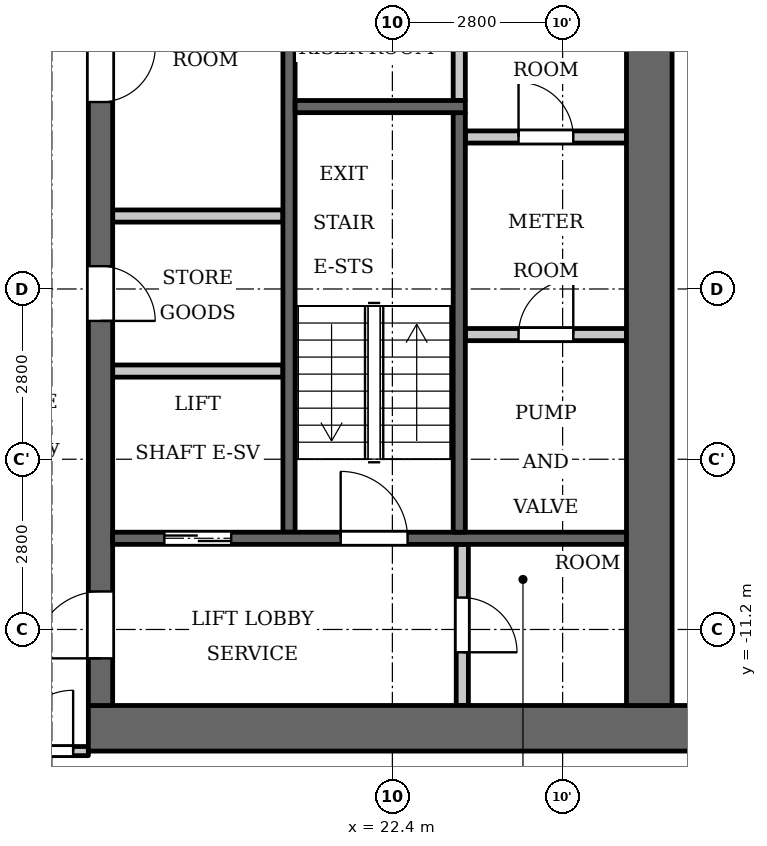
"""IFC4 building model, lengths in metres.
Left out: names, types, materials, properties, quantities, classifications, styles, units other than length and angle.
Written with IfcOpenShell. Run it as: python <this file> out.ifc"""

import sys

from ifc_helpers import new_model, si_unit, direction, frame, frame_2d, origin, place, context, subcontext, project, spatial, rectangle, extrude, element, fill, save


model = new_model("IFC4")
c1 = context("Model", 3, precision=1e-05, world=origin(), true_north=direction((0.0, 1.0)))
c2 = subcontext(c1, "Body", "Model", "MODEL_VIEW")
j1 = project(units=[si_unit("LENGTHUNIT", "METRE"), si_unit("PLANEANGLEUNIT", "RADIAN")], contexts=[c1])
p1 = place(None, origin())
s1 = spatial("IfcSite", under=j1, at=p1, CompositionType="ELEMENT")
p2 = place(p1, origin())
s2 = spatial("IfcBuilding", under=s1, at=p2, CompositionType="ELEMENT")
p3 = place(p2, frame((0.0, 0.0, 150.1)))
s3 = spatial("IfcBuildingStorey", under=s2, at=p3, CompositionType="ELEMENT", Elevation=150.1)
p4 = place(p3, frame((23.5, -2.5, 0.0), z_axis=(0.0, 0.0, 1.0), x_axis=(0.0, 1.0, 0.0)))
e1 = element("IfcWall", 1, at=p4, inside=s3, PredefinedType="PARTITIONING", context=c2, shape_type="SweptSolid", body=[
    extrude(rectangle(XDim=2.65, YDim=0.2, at=frame_2d((1.325, 0.0))), origin(), (0.0, 0.0, 1.0), 3.2),
])
p5 = place(p3, frame((20.7, -9.6, 0.0), z_axis=(0.0, 0.0, 1.0), x_axis=(0.0, 1.0, 0.0)))
e2 = element("IfcWall", 2, at=p5, inside=s3, PredefinedType="SHEAR", context=c2, shape_type="SweptSolid", body=[
    extrude(rectangle(XDim=9.75, YDim=0.2, at=frame_2d((4.875, 0.0))), origin(), (0.0, 0.0, 1.0), 3.2),
])
p6 = place(p3, frame((17.4, -12.825, 0.0), z_axis=(0.0, 0.0, 1.0), x_axis=(1.0, 0.0, 0.0)))
e3 = element("IfcWall", 3, at=p6, inside=s3, PredefinedType="SHEAR", context=c2, shape_type="SweptSolid", body=[
    extrude(rectangle(XDim=10.4, YDim=0.75, at=frame_2d((5.2, 0.0))), origin(), (0.0, 0.0, 1.0), 3.2),
])
p7 = place(p3, frame((17.8, -4.4, 0.0), z_axis=(0.0, 0.0, 1.0), x_axis=(1.0, 0.0, 0.0)))
e4 = element("IfcWall", 4, at=p7, inside=s3, PredefinedType="PARTITIONING", context=c2, shape_type="SweptSolid", body=[
    extrude(rectangle(XDim=2.8, YDim=0.2, at=frame_2d((1.4, 0.0))), origin(), (0.0, 0.0, 1.0), 3.2),
])
p8 = place(p3, frame((17.6, -12.45, 0.0), z_axis=(0.0, 0.0, 1.0), x_axis=(0.0, 1.0, 0.0)))
e5 = element("IfcWall", 5, at=p8, inside=s3, PredefinedType="SHEAR", context=c2, shape_type="SweptSolid", body=[
    extrude(rectangle(XDim=24.9, YDim=0.4, at=frame_2d((12.45, 0.0))), origin(), (0.0, 0.0, 1.0), 3.2),
])
p9 = place(p8, frame((6.325, 0.0, 0.0)))
e6 = element("IfcOpeningElement", 6, at=p9, cuts=e5, PredefinedType="OPENING", context=c2, shape_type="SweptSolid", body=[
    extrude(rectangle(XDim=0.9, YDim=2.1, at=frame_2d((0.45, 1.05))), frame((0.0, 0.21, 0.0), z_axis=(0.0, -1.0, 0.0), x_axis=(1.0, 0.0, 0.0)), (0.0, 0.0, 1.0), 0.42),
])
p10 = place(p8, frame((9.925, 0.0, 0.0)))
e7 = element("IfcOpeningElement", 7, at=p10, cuts=e5, PredefinedType="OPENING", context=c2, shape_type="SweptSolid", body=[
    extrude(rectangle(XDim=0.9, YDim=2.1, at=frame_2d((0.45, 1.05))), frame((0.0, 0.21, 0.0), z_axis=(0.0, -1.0, 0.0), x_axis=(1.0, 0.0, 0.0)), (0.0, 0.0, 1.0), 0.42),
])
p11 = place(p8, frame((15.6, 0.0, 0.0)))
e8 = element("IfcOpeningElement", 8, at=p11, cuts=e5, PredefinedType="OPENING", context=c2, shape_type="SweptSolid", body=[
    extrude(rectangle(XDim=1.1, YDim=2.1, at=frame_2d((0.55, 1.05))), frame((0.0, 0.21, 0.0), z_axis=(0.0, -1.0, 0.0), x_axis=(1.0, 0.0, 0.0)), (0.0, 0.0, 1.0), 0.42),
])
p12 = place(p8, frame((18.0, 0.0, 0.0)))
e9 = element("IfcOpeningElement", 9, at=p12, cuts=e5, PredefinedType="OPENING", context=c2, shape_type="SweptSolid", body=[
    extrude(rectangle(XDim=1.1, YDim=2.1, at=frame_2d((0.55, 1.05))), frame((0.0, 0.21, 0.0), z_axis=(0.0, -1.0, 0.0), x_axis=(1.0, 0.0, 0.0)), (0.0, 0.0, 1.0), 0.42),
])
p13 = place(p8, frame((23.025, 0.0, 0.0)))
e10 = element("IfcOpeningElement", 10, at=p13, cuts=e5, PredefinedType="OPENING", context=c2, shape_type="SweptSolid", body=[
    extrude(rectangle(XDim=1.1, YDim=2.1, at=frame_2d((0.55, 1.05))), frame((0.0, 0.21, 0.0), z_axis=(0.0, -1.0, 0.0), x_axis=(1.0, 0.0, 0.0)), (0.0, 0.0, 1.0), 0.42),
])
p14 = place(p8, frame((0.775, 0.0, 0.0)))
e11 = element("IfcOpeningElement", 11, at=p14, cuts=e5, PredefinedType="OPENING", context=c2, shape_type="SweptSolid", body=[
    extrude(rectangle(XDim=1.1, YDim=2.1, at=frame_2d((0.55, 1.05))), frame((0.0, 0.21, 0.0), z_axis=(0.0, -1.0, 0.0), x_axis=(1.0, 0.0, 0.0)), (0.0, 0.0, 1.0), 0.42),
])
p15 = place(p8, frame((12.925, 0.0, 0.0)))
e12 = element("IfcOpeningElement", 12, at=p15, cuts=e5, PredefinedType="OPENING", context=c2, shape_type="SweptSolid", body=[
    extrude(rectangle(XDim=1.8, YDim=2.1, at=frame_2d((0.9, 1.05))), frame((0.0, 0.21, 0.0), z_axis=(0.0, -1.0, 0.0), x_axis=(1.0, 0.0, 0.0)), (0.0, 0.0, 1.0), 0.42),
])
p16 = place(p3, frame((26.625, -12.45, 0.0), z_axis=(0.0, 0.0, 1.0), x_axis=(0.0, 1.0, 0.0)))
e13 = element("IfcWall", 13, at=p16, inside=s3, PredefinedType="SHEAR", context=c2, shape_type="SweptSolid", body=[
    extrude(rectangle(XDim=24.9, YDim=0.75, at=frame_2d((12.45, 0.0))), origin(), (0.0, 0.0, 1.0), 3.2),
])
p17 = place(p3, frame((23.55, -12.45, 0.0), z_axis=(0.0, 0.0, 1.0), x_axis=(0.0, 1.0, 0.0)))
e14 = element("IfcWall", 14, at=p17, inside=s3, PredefinedType="PARTITIONING", context=c2, shape_type="SweptSolid", body=[
    extrude(rectangle(XDim=2.65, YDim=0.2, at=frame_2d((1.325, 0.0))), origin(), (0.0, 0.0, 1.0), 3.2),
])
p18 = place(p17, frame((0.875, 0.0, 0.0)))
e15 = element("IfcOpeningElement", 15, at=p18, cuts=e14, PredefinedType="OPENING", context=c2, shape_type="SweptSolid", body=[
    extrude(rectangle(XDim=0.9, YDim=2.1, at=frame_2d((0.45, 1.05))), frame((0.0, 0.11, 0.0), z_axis=(0.0, -1.0, 0.0), x_axis=(1.0, 0.0, 0.0)), (0.0, 0.0, 1.0), 0.22),
])
p19 = place(p3, frame((23.6, -6.35, 0.0), z_axis=(0.0, 0.0, 1.0), x_axis=(1.0, 0.0, 0.0)))
e16 = element("IfcWall", 16, at=p19, inside=s3, PredefinedType="PARTITIONING", context=c2, shape_type="SweptSolid", body=[
    extrude(rectangle(XDim=2.65, YDim=0.2, at=frame_2d((1.325, 0.0))), origin(), (0.0, 0.0, 1.0), 3.2),
])
p20 = place(p19, frame((0.875, 0.0, 0.0)))
e17 = element("IfcOpeningElement", 17, at=p20, cuts=e16, PredefinedType="OPENING", context=c2, shape_type="SweptSolid", body=[
    extrude(rectangle(XDim=0.9, YDim=2.1, at=frame_2d((0.45, 1.05))), frame((0.0, 0.11, 0.0), z_axis=(0.0, -1.0, 0.0), x_axis=(1.0, 0.0, 0.0)), (0.0, 0.0, 1.0), 0.22),
])
p21 = place(p3, frame((23.6, -3.1, 0.0), z_axis=(0.0, 0.0, 1.0), x_axis=(1.0, 0.0, 0.0)))
e18 = element("IfcWall", 18, at=p21, inside=s3, PredefinedType="PARTITIONING", context=c2, shape_type="SweptSolid", body=[
    extrude(rectangle(XDim=2.65, YDim=0.2, at=frame_2d((1.325, 0.0))), origin(), (0.0, 0.0, 1.0), 3.2),
])
p22 = place(p21, frame((0.875, 0.0, 0.0)))
e19 = element("IfcOpeningElement", 19, at=p22, cuts=e18, PredefinedType="OPENING", context=c2, shape_type="SweptSolid", body=[
    extrude(rectangle(XDim=0.9, YDim=2.1, at=frame_2d((0.45, 1.05))), frame((0.0, 0.11, 0.0), z_axis=(0.0, -1.0, 0.0), x_axis=(1.0, 0.0, 0.0)), (0.0, 0.0, 1.0), 0.22),
])
p23 = place(p3, frame((17.8, -9.7, 0.0), z_axis=(0.0, 0.0, 1.0), x_axis=(1.0, 0.0, 0.0)))
e20 = element("IfcWall", 20, at=p23, inside=s3, PredefinedType="SHEAR", context=c2, shape_type="SweptSolid", body=[
    extrude(rectangle(XDim=8.45, YDim=0.2, at=frame_2d((4.225, 0.0))), origin(), (0.0, 0.0, 1.0), 3.2),
])
p24 = place(p23, frame((0.85, 0.0, 0.0)))
e21 = element("IfcOpeningElement", 21, at=p24, cuts=e20, PredefinedType="OPENING", context=c2, shape_type="SweptSolid", body=[
    extrude(rectangle(XDim=1.1, YDim=2.1, at=frame_2d((0.55, 1.05))), frame((0.0, 0.11, 0.0), z_axis=(0.0, -1.0, 0.0), x_axis=(1.0, 0.0, 0.0)), (0.0, 0.0, 1.0), 0.22),
])
p25 = place(p23, frame((3.75, 0.0, 0.0)))
e22 = element("IfcOpeningElement", 22, at=p25, cuts=e20, PredefinedType="OPENING", context=c2, shape_type="SweptSolid", body=[
    extrude(rectangle(XDim=1.1, YDim=2.1, at=frame_2d((0.55, 1.05))), frame((0.0, 0.11, 0.0), z_axis=(0.0, -1.0, 0.0), x_axis=(1.0, 0.0, 0.0)), (0.0, 0.0, 1.0), 0.22),
])
p26 = place(p3, frame((17.8, -6.95, 0.0), z_axis=(0.0, 0.0, 1.0), x_axis=(1.0, 0.0, 0.0)))
e23 = element("IfcWall", 23, at=p26, inside=s3, PredefinedType="PARTITIONING", context=c2, shape_type="SweptSolid", body=[
    extrude(rectangle(XDim=2.8, YDim=0.2, at=frame_2d((1.4, 0.0))), origin(), (0.0, 0.0, 1.0), 3.2),
])
p27 = place(p3, frame((23.5, -9.6, 0.0), z_axis=(0.0, 0.0, 1.0), x_axis=(0.0, 1.0, 0.0)))
e24 = element("IfcWall", 24, at=p27, inside=s3, PredefinedType="SHEAR", context=c2, shape_type="SweptSolid", body=[
    extrude(rectangle(XDim=6.9, YDim=0.2, at=frame_2d((3.45, 0.0))), origin(), (0.0, 0.0, 1.0), 3.2),
])
p28 = place(p3, frame((20.8, -2.6, 0.0), z_axis=(0.0, 0.0, 1.0), x_axis=(1.0, 0.0, 0.0)))
e25 = element("IfcWall", 25, at=p28, inside=s3, PredefinedType="SHEAR", context=c2, shape_type="SweptSolid", body=[
    extrude(rectangle(XDim=2.8, YDim=0.2, at=frame_2d((1.4, 0.0))), origin(), (0.0, 0.0, 1.0), 3.2),
])
p29 = place(p3, frame((-17.4, -13.2, 0.0), z_axis=(0.0, 0.0, 1.0), x_axis=(1.0, 0.0, 0.0)))
e26 = element("IfcWall", 26, at=p29, inside=s3, PredefinedType="PARTITIONING", context=c2, shape_type="SweptSolid", body=[
    extrude(rectangle(XDim=34.8, YDim=0.15, at=frame_2d((17.4, 0.0))), origin(), (0.0, 0.0, 1.0), 3.2),
])
p30 = place(p29, frame((0.15, 0.0, 0.0)))
e27 = element("IfcOpeningElement", 27, at=p30, cuts=e26, PredefinedType="OPENING", context=c2, shape_type="SweptSolid", body=[
    extrude(rectangle(XDim=1.0, YDim=2.1, at=frame_2d((0.5, 1.05))), frame((0.0, 0.085, 0.0), z_axis=(0.0, -1.0, 0.0), x_axis=(1.0, 0.0, 0.0)), (0.0, 0.0, 1.0), 0.17),
])
p31 = place(p29, frame((33.55, 0.0, 0.0)))
e28 = element("IfcOpeningElement", 28, at=p31, cuts=e26, PredefinedType="OPENING", context=c2, shape_type="SweptSolid", body=[
    extrude(rectangle(XDim=1.0, YDim=2.1, at=frame_2d((0.5, 1.05))), frame((0.0, 0.085, 0.0), z_axis=(0.0, -1.0, 0.0), x_axis=(1.0, 0.0, 0.0)), (0.0, 0.0, 1.0), 0.17),
])
p32 = place(p29, frame((15.7, 0.0, 0.0)))
e29 = element("IfcOpeningElement", 29, at=p32, cuts=e26, PredefinedType="OPENING", context=c2, shape_type="SweptSolid", body=[
    extrude(rectangle(XDim=1.0, YDim=2.1, at=frame_2d((0.5, 1.05))), frame((0.0, 0.085, 0.0), z_axis=(0.0, -1.0, 0.0), x_axis=(1.0, 0.0, 0.0)), (0.0, 0.0, 1.0), 0.17),
])
p33 = place(p24, origin())
e30 = element("IfcDoor", 30, at=p33, inside=s3, OperationType="DOUBLE_DOOR_SLIDING", PredefinedType="DOOR", context=c2, shape_type="SweptSolid", body=[
    extrude(rectangle(XDim=1.1, YDim=2.1, at=frame_2d((0.55, 1.05))), frame((0.0, 0.025, 0.0), z_axis=(0.0, -1.0, 0.0), x_axis=(1.0, 0.0, 0.0)), (0.0, 0.0, 1.0), 0.05),
])
fill(e21, e30)
p34 = place(p9, origin())
e31 = element("IfcDoor", 31, at=p34, inside=s3, OperationType="SINGLE_SWING_LEFT", PredefinedType="DOOR", context=c2, shape_type="SweptSolid", body=[
    extrude(rectangle(XDim=0.9, YDim=2.1, at=frame_2d((0.45, 1.05))), frame((0.0, 0.025, 0.0), z_axis=(0.0, -1.0, 0.0), x_axis=(1.0, 0.0, 0.0)), (0.0, 0.0, 1.0), 0.05),
])
fill(e6, e31)
p35 = place(p10, origin())
e32 = element("IfcDoor", 32, at=p35, inside=s3, OperationType="SINGLE_SWING_RIGHT", PredefinedType="DOOR", context=c2, shape_type="SweptSolid", body=[
    extrude(rectangle(XDim=0.9, YDim=2.1, at=frame_2d((0.45, 1.05))), frame((0.0, 0.025, 0.0), z_axis=(0.0, -1.0, 0.0), x_axis=(1.0, 0.0, 0.0)), (0.0, 0.0, 1.0), 0.05),
])
fill(e7, e32)
p36 = place(p14, origin())
e33 = element("IfcDoor", 33, at=p36, inside=s3, OperationType="SINGLE_SWING_RIGHT", PredefinedType="DOOR", context=c2, shape_type="SweptSolid", body=[
    extrude(rectangle(XDim=1.1, YDim=2.1, at=frame_2d((0.55, 1.05))), frame((0.0, 0.025, 0.0), z_axis=(0.0, -1.0, 0.0), x_axis=(1.0, 0.0, 0.0)), (0.0, 0.0, 1.0), 0.05),
])
fill(e11, e33)
p37 = place(p18, origin())
e34 = element("IfcDoor", 34, at=p37, inside=s3, OperationType="SINGLE_SWING_LEFT", PredefinedType="DOOR", context=c2, shape_type="SweptSolid", body=[
    extrude(rectangle(XDim=0.9, YDim=2.1, at=frame_2d((0.45, 1.05))), frame((0.0, 0.025, 0.0), z_axis=(0.0, -1.0, 0.0), x_axis=(1.0, 0.0, 0.0)), (0.0, 0.0, 1.0), 0.05),
])
fill(e15, e34)
p38 = place(p25, origin())
e35 = element("IfcDoor", 35, at=p38, inside=s3, OperationType="SINGLE_SWING_RIGHT", PredefinedType="DOOR", context=c2, shape_type="SweptSolid", body=[
    extrude(rectangle(XDim=1.1, YDim=2.1, at=frame_2d((0.55, 1.05))), frame((0.0, 0.025, 0.0), z_axis=(0.0, -1.0, 0.0), x_axis=(1.0, 0.0, 0.0)), (0.0, 0.0, 1.0), 0.05),
])
fill(e22, e35)
p39 = place(p20, origin())
e36 = element("IfcDoor", 36, at=p39, inside=s3, OperationType="SINGLE_SWING_LEFT", PredefinedType="DOOR", context=c2, shape_type="SweptSolid", body=[
    extrude(rectangle(XDim=0.9, YDim=2.1, at=frame_2d((0.45, 1.05))), frame((0.0, 0.025, 0.0), z_axis=(0.0, -1.0, 0.0), x_axis=(1.0, 0.0, 0.0)), (0.0, 0.0, 1.0), 0.05),
])
fill(e17, e36)
p40 = place(p22, origin())
e37 = element("IfcDoor", 37, at=p40, inside=s3, OperationType="SINGLE_SWING_RIGHT", PredefinedType="DOOR", context=c2, shape_type="SweptSolid", body=[
    extrude(rectangle(XDim=0.9, YDim=2.1, at=frame_2d((0.45, 1.05))), frame((0.0, 0.025, 0.0), z_axis=(0.0, -1.0, 0.0), x_axis=(1.0, 0.0, 0.0)), (0.0, 0.0, 1.0), 0.05),
])
fill(e19, e37)
p41 = place(p31, origin())
e38 = element("IfcDoor", 38, at=p41, inside=s3, OperationType="SINGLE_SWING_LEFT", PredefinedType="DOOR", context=c2, shape_type="SweptSolid", body=[
    extrude(rectangle(XDim=1.0, YDim=2.1, at=frame_2d((0.5, 1.05))), frame((0.0, 0.025, 0.0), z_axis=(0.0, -1.0, 0.0), x_axis=(1.0, 0.0, 0.0)), (0.0, 0.0, 1.0), 0.05),
])
fill(e28, e38)
save(model, sys.argv[1])
